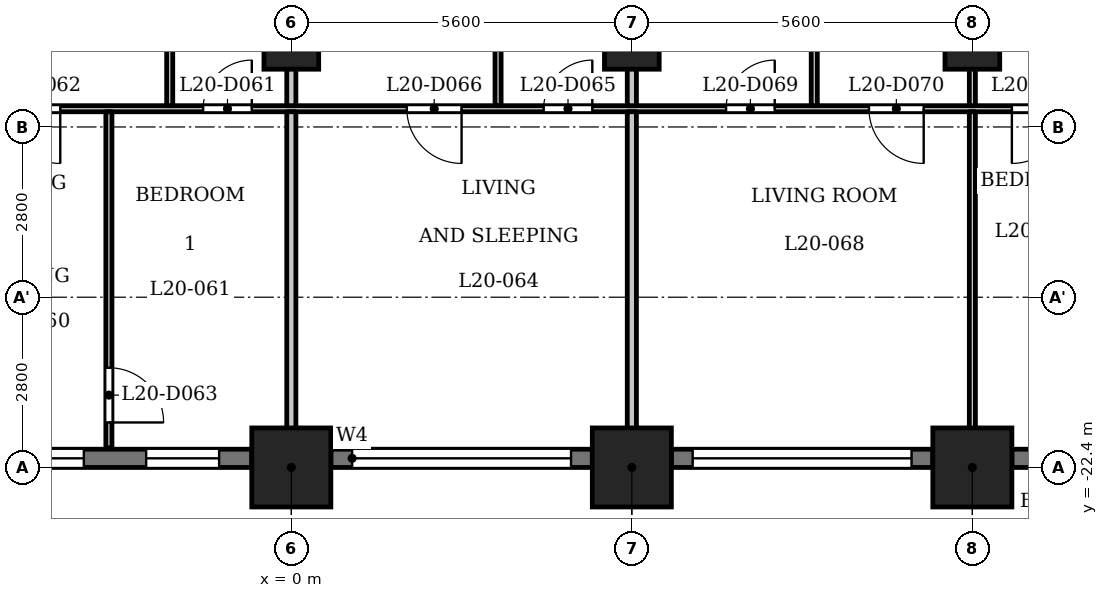
"""IFC4 building model, lengths in metres.
Left out: names, types, materials, properties, quantities, classifications, styles, units other than length and angle.
Written with IfcOpenShell. Run it as: python <this file> out.ifc"""

import sys

from ifc_helpers import new_model, si_unit, direction, frame, frame_2d, origin, origin_2d, place, context, subcontext, project, spatial, rectangle, extrude, element, fill, save


model = new_model("IFC4")
c1 = context("Model", 3, precision=1e-05, world=origin(), true_north=direction((0.0, 1.0)))
c2 = subcontext(c1, "Body", "Model", "MODEL_VIEW")
j1 = project(units=[si_unit("LENGTHUNIT", "METRE"), si_unit("PLANEANGLEUNIT", "RADIAN")], contexts=[c1])
p1 = place(None, origin())
s1 = spatial("IfcSite", under=j1, at=p1, CompositionType="ELEMENT")
p2 = place(p1, origin())
s2 = spatial("IfcBuilding", under=s1, at=p2, CompositionType="ELEMENT")
p3 = place(p2, frame((0.0, 0.0, 83.3)))
s3 = spatial("IfcBuildingStorey", under=s2, at=p3, CompositionType="ELEMENT", Elevation=83.3)
for number, where, z_axis, x_axis in (
    (1, (0.0, -22.4, 0.0), (0.0, 0.0, 1.0), (1.0, 0.0, 0.0)),
    (2, (5.6, -22.4, 0.0), (0.0, 0.0, 1.0), (1.0, 0.0, 0.0)),
    (3, (11.2, -22.4, 0.0), (0.0, 0.0, 1.0), (1.0, 0.0, 0.0)),
):
    element("IfcColumn", number, at=place(p3, frame(where, z_axis=z_axis, x_axis=x_axis)), inside=s3, PredefinedType="COLUMN", context=c2, shape_type="SweptSolid", body=[
        extrude(rectangle(XDim=1.3, YDim=1.3, at=origin_2d()), origin(), (0.0, 0.0, 1.0), 3.5),
    ])
for number, where, z_axis, x_axis in (
    (4, (0.0, -15.4, 0.0), (0.0, 0.0, 1.0), (1.0, 0.0, 0.0)),
    (5, (5.6, -15.4, 0.0), (0.0, 0.0, 1.0), (1.0, 0.0, 0.0)),
    (6, (11.2, -15.4, 0.0), (0.0, 0.0, 1.0), (1.0, 0.0, 0.0)),
):
    element("IfcColumn", number, at=place(p3, frame(where, z_axis=z_axis, x_axis=x_axis)), inside=s3, PredefinedType="COLUMN", context=c2, shape_type="SweptSolid", body=[
        extrude(rectangle(XDim=0.9, YDim=0.9, at=origin_2d()), origin(), (0.0, 0.0, 1.0), 3.5),
    ])
p4 = place(p3, frame((-4.95, -22.25, 0.0), z_axis=(0.0, 0.0, 1.0), x_axis=(1.0, 0.0, 0.0)))
e7 = element("IfcWall", 7, at=p4, inside=s3, PredefinedType="SOLIDWALL", context=c2, shape_type="SweptSolid", body=[
    extrude(rectangle(XDim=4.3, YDim=0.3, at=frame_2d((2.15, 0.0))), origin(), (0.0, 0.0, 1.0), 2.4),
])
p5 = place(p4, frame((0.337, 0.0, 0.6)))
e8 = element("IfcOpeningElement", 8, at=p5, cuts=e7, PredefinedType="OPENING", context=c2, shape_type="SweptSolid", body=[
    extrude(rectangle(XDim=1.2, YDim=1.55, at=frame_2d((0.6, 0.775))), frame((0.0, 0.16, 0.0), z_axis=(0.0, -1.0, 0.0), x_axis=(1.0, 0.0, 0.0)), (0.0, 0.0, 1.0), 0.32),
])
p6 = place(p4, frame((2.562, 0.0, 0.6)))
e9 = element("IfcOpeningElement", 9, at=p6, cuts=e7, PredefinedType="OPENING", context=c2, shape_type="SweptSolid", body=[
    extrude(rectangle(XDim=1.2, YDim=1.55, at=frame_2d((0.6, 0.775))), frame((0.0, 0.16, 0.0), z_axis=(0.0, -1.0, 0.0), x_axis=(1.0, 0.0, 0.0)), (0.0, 0.0, 1.0), 0.32),
])
p7 = place(p3, frame((0.65, -22.25, 0.0), z_axis=(0.0, 0.0, 1.0), x_axis=(1.0, 0.0, 0.0)))
e10 = element("IfcWall", 10, at=p7, inside=s3, PredefinedType="SOLIDWALL", context=c2, shape_type="SweptSolid", body=[
    extrude(rectangle(XDim=4.3, YDim=0.3, at=frame_2d((2.15, 0.0))), origin(), (0.0, 0.0, 1.0), 2.4),
])
p8 = place(p7, frame((0.35, 0.0, 1.2)))
e11 = element("IfcOpeningElement", 11, at=p8, cuts=e10, PredefinedType="OPENING", context=c2, shape_type="SweptSolid", body=[
    extrude(rectangle(XDim=3.6, YDim=0.95, at=frame_2d((1.8, 0.475))), frame((0.0, 0.16, 0.0), z_axis=(0.0, -1.0, 0.0), x_axis=(1.0, 0.0, 0.0)), (0.0, 0.0, 1.0), 0.32),
])
p9 = place(p3, frame((6.25, -22.25, 0.0), z_axis=(0.0, 0.0, 1.0), x_axis=(1.0, 0.0, 0.0)))
e12 = element("IfcWall", 12, at=p9, inside=s3, PredefinedType="SOLIDWALL", context=c2, shape_type="SweptSolid", body=[
    extrude(rectangle(XDim=4.3, YDim=0.3, at=frame_2d((2.15, 0.0))), origin(), (0.0, 0.0, 1.0), 2.4),
])
p10 = place(p9, frame((0.35, 0.0, 1.2)))
e13 = element("IfcOpeningElement", 13, at=p10, cuts=e12, PredefinedType="OPENING", context=c2, shape_type="SweptSolid", body=[
    extrude(rectangle(XDim=3.6, YDim=0.95, at=frame_2d((1.8, 0.475))), frame((0.0, 0.16, 0.0), z_axis=(0.0, -1.0, 0.0), x_axis=(1.0, 0.0, 0.0)), (0.0, 0.0, 1.0), 0.32),
])
p11 = place(p3, frame((11.85, -22.25, 0.0), z_axis=(0.0, 0.0, 1.0), x_axis=(1.0, 0.0, 0.0)))
e14 = element("IfcWall", 14, at=p11, inside=s3, PredefinedType="SOLIDWALL", context=c2, shape_type="SweptSolid", body=[
    extrude(rectangle(XDim=4.3, YDim=0.3, at=frame_2d((2.15, 0.0))), origin(), (0.0, 0.0, 1.0), 2.4),
])
p12 = place(p11, frame((0.337, 0.0, 0.6)))
e15 = element("IfcOpeningElement", 15, at=p12, cuts=e14, PredefinedType="OPENING", context=c2, shape_type="SweptSolid", body=[
    extrude(rectangle(XDim=1.2, YDim=1.55, at=frame_2d((0.6, 0.775))), frame((0.0, 0.16, 0.0), z_axis=(0.0, -1.0, 0.0), x_axis=(1.0, 0.0, 0.0)), (0.0, 0.0, 1.0), 0.32),
])
p13 = place(p11, frame((2.562, 0.0, 0.6)))
e16 = element("IfcOpeningElement", 16, at=p13, cuts=e14, PredefinedType="OPENING", context=c2, shape_type="SweptSolid", body=[
    extrude(rectangle(XDim=1.2, YDim=1.55, at=frame_2d((0.6, 0.775))), frame((0.0, 0.16, 0.0), z_axis=(0.0, -1.0, 0.0), x_axis=(1.0, 0.0, 0.0)), (0.0, 0.0, 1.0), 0.32),
])
p14 = place(p3, frame((-16.725, -16.5, 0.0), z_axis=(0.0, 0.0, 1.0), x_axis=(1.0, 0.0, 0.0)))
e17 = element("IfcWall", 17, at=p14, inside=s3, PredefinedType="PARTITIONING", context=c2, shape_type="SweptSolid", body=[
    extrude(rectangle(XDim=33.45, YDim=0.1, at=frame_2d((16.725, 0.0))), origin(), (0.0, 0.0, 1.0), 3.2),
])
p15 = place(p14, frame((3.825, 0.0, 0.0)))
e18 = element("IfcOpeningElement", 18, at=p15, cuts=e17, PredefinedType="OPENING", context=c2, shape_type="SweptSolid", body=[
    extrude(rectangle(XDim=0.8, YDim=2.1, at=frame_2d((0.4, 1.05))), frame((0.0, 0.06, 0.0), z_axis=(0.0, -1.0, 0.0), x_axis=(1.0, 0.0, 0.0)), (0.0, 0.0, 1.0), 0.12),
])
p16 = place(p14, frame((1.825, 0.0, 0.0)))
e19 = element("IfcOpeningElement", 19, at=p16, cuts=e17, PredefinedType="OPENING", context=c2, shape_type="SweptSolid", body=[
    extrude(rectangle(XDim=0.9, YDim=2.1, at=frame_2d((0.45, 1.05))), frame((0.0, 0.06, 0.0), z_axis=(0.0, -1.0, 0.0), x_axis=(1.0, 0.0, 0.0)), (0.0, 0.0, 1.0), 0.12),
])
p17 = place(p14, frame((9.675, 0.0, 0.0)))
e20 = element("IfcOpeningElement", 20, at=p17, cuts=e17, PredefinedType="OPENING", context=c2, shape_type="SweptSolid", body=[
    extrude(rectangle(XDim=0.8, YDim=2.1, at=frame_2d((0.4, 1.05))), frame((0.0, 0.06, 0.0), z_axis=(0.0, -1.0, 0.0), x_axis=(1.0, 0.0, 0.0)), (0.0, 0.0, 1.0), 0.12),
])
p18 = place(p14, frame((6.425, 0.0, 0.0)))
e21 = element("IfcOpeningElement", 21, at=p18, cuts=e17, PredefinedType="OPENING", context=c2, shape_type="SweptSolid", body=[
    extrude(rectangle(XDim=0.9, YDim=2.1, at=frame_2d((0.45, 1.05))), frame((0.0, 0.06, 0.0), z_axis=(0.0, -1.0, 0.0), x_axis=(1.0, 0.0, 0.0)), (0.0, 0.0, 1.0), 0.12),
])
p19 = place(p14, frame((15.275, 0.0, 0.0)))
e22 = element("IfcOpeningElement", 22, at=p19, cuts=e17, PredefinedType="OPENING", context=c2, shape_type="SweptSolid", body=[
    extrude(rectangle(XDim=0.8, YDim=2.1, at=frame_2d((0.4, 1.05))), frame((0.0, 0.06, 0.0), z_axis=(0.0, -1.0, 0.0), x_axis=(1.0, 0.0, 0.0)), (0.0, 0.0, 1.0), 0.12),
])
p20 = place(p14, frame((12.025, 0.0, 0.0)))
e23 = element("IfcOpeningElement", 23, at=p20, cuts=e17, PredefinedType="OPENING", context=c2, shape_type="SweptSolid", body=[
    extrude(rectangle(XDim=0.9, YDim=2.1, at=frame_2d((0.45, 1.05))), frame((0.0, 0.06, 0.0), z_axis=(0.0, -1.0, 0.0), x_axis=(1.0, 0.0, 0.0)), (0.0, 0.0, 1.0), 0.12),
])
p21 = place(p14, frame((20.875, 0.0, 0.0)))
e24 = element("IfcOpeningElement", 24, at=p21, cuts=e17, PredefinedType="OPENING", context=c2, shape_type="SweptSolid", body=[
    extrude(rectangle(XDim=0.8, YDim=2.1, at=frame_2d((0.4, 1.05))), frame((0.0, 0.06, 0.0), z_axis=(0.0, -1.0, 0.0), x_axis=(1.0, 0.0, 0.0)), (0.0, 0.0, 1.0), 0.12),
])
p22 = place(p14, frame((18.625, 0.0, 0.0)))
e25 = element("IfcOpeningElement", 25, at=p22, cuts=e17, PredefinedType="OPENING", context=c2, shape_type="SweptSolid", body=[
    extrude(rectangle(XDim=0.9, YDim=2.1, at=frame_2d((0.45, 1.05))), frame((0.0, 0.06, 0.0), z_axis=(0.0, -1.0, 0.0), x_axis=(1.0, 0.0, 0.0)), (0.0, 0.0, 1.0), 0.12),
])
p23 = place(p14, frame((23.875, 0.0, 0.0)))
e26 = element("IfcOpeningElement", 26, at=p23, cuts=e17, PredefinedType="OPENING", context=c2, shape_type="SweptSolid", body=[
    extrude(rectangle(XDim=0.8, YDim=2.1, at=frame_2d((0.4, 1.05))), frame((0.0, 0.06, 0.0), z_axis=(0.0, -1.0, 0.0), x_axis=(1.0, 0.0, 0.0)), (0.0, 0.0, 1.0), 0.12),
])
p24 = place(p14, frame((26.225, 0.0, 0.0)))
e27 = element("IfcOpeningElement", 27, at=p24, cuts=e17, PredefinedType="OPENING", context=c2, shape_type="SweptSolid", body=[
    extrude(rectangle(XDim=0.9, YDim=2.1, at=frame_2d((0.45, 1.05))), frame((0.0, 0.06, 0.0), z_axis=(0.0, -1.0, 0.0), x_axis=(1.0, 0.0, 0.0)), (0.0, 0.0, 1.0), 0.12),
])
p25 = place(p14, frame((28.575, 0.0, 0.0)))
e28 = element("IfcOpeningElement", 28, at=p25, cuts=e17, PredefinedType="OPENING", context=c2, shape_type="SweptSolid", body=[
    extrude(rectangle(XDim=0.9, YDim=2.1, at=frame_2d((0.45, 1.05))), frame((0.0, 0.06, 0.0), z_axis=(0.0, -1.0, 0.0), x_axis=(1.0, 0.0, 0.0)), (0.0, 0.0, 1.0), 0.12),
])
p26 = place(p14, frame((30.675, 0.0, 0.0)))
e29 = element("IfcOpeningElement", 29, at=p26, cuts=e17, PredefinedType="OPENING", context=c2, shape_type="SweptSolid", body=[
    extrude(rectangle(XDim=0.9, YDim=2.1, at=frame_2d((0.45, 1.05))), frame((0.0, 0.06, 0.0), z_axis=(0.0, -1.0, 0.0), x_axis=(1.0, 0.0, 0.0)), (0.0, 0.0, 1.0), 0.12),
])
p27 = place(p3, frame((-3.0, -22.08, 0.0), z_axis=(0.0, 0.0, 1.0), x_axis=(0.0, 1.0, 0.0)))
e30 = element("IfcWall", 30, at=p27, inside=s3, PredefinedType="PARTITIONING", context=c2, shape_type="SweptSolid", body=[
    extrude(rectangle(XDim=5.53, YDim=0.1, at=frame_2d((2.765, 0.0))), origin(), (0.0, 0.0, 1.0), 3.2),
])
p28 = place(p27, frame((0.42, 0.0, 0.0)))
e31 = element("IfcOpeningElement", 31, at=p28, cuts=e30, PredefinedType="OPENING", context=c2, shape_type="SweptSolid", body=[
    extrude(rectangle(XDim=0.9, YDim=2.1, at=frame_2d((0.45, 1.05))), frame((0.0, 0.06, 0.0), z_axis=(0.0, -1.0, 0.0), x_axis=(1.0, 0.0, 0.0)), (0.0, 0.0, 1.0), 0.12),
])
p29 = place(p3, frame((-2.0, -16.45, 0.0), z_axis=(0.0, 0.0, 1.0), x_axis=(0.0, 1.0, 0.0)))
e32 = element("IfcWall", 32, at=p29, inside=s3, PredefinedType="PARTITIONING", context=c2, shape_type="SweptSolid", body=[
    extrude(rectangle(XDim=3.175, YDim=0.1, at=frame_2d((1.587, 0.0))), origin(), (0.0, 0.0, 1.0), 3.2),
])
p30 = place(p3, frame((0.0, -23.03, 0.0), z_axis=(0.0, 0.0, 1.0), x_axis=(0.0, 1.0, 0.0)))
e33 = element("IfcWall", 33, at=p30, inside=s3, PredefinedType="PARTITIONING", context=c2, shape_type="SweptSolid", body=[
    extrude(rectangle(XDim=6.48, YDim=0.15, at=frame_2d((3.24, 0.0))), origin(), (0.0, 0.0, 1.0), 3.2),
])
p31 = place(p3, frame((0.0, -16.45, 0.0), z_axis=(0.0, 0.0, 1.0), x_axis=(0.0, 1.0, 0.0)))
e34 = element("IfcWall", 34, at=p31, inside=s3, PredefinedType="PARTITIONING", context=c2, shape_type="SweptSolid", body=[
    extrude(rectangle(XDim=3.175, YDim=0.15, at=frame_2d((1.587, 0.0))), origin(), (0.0, 0.0, 1.0), 3.2),
])
p32 = place(p3, frame((3.4, -16.45, 0.0), z_axis=(0.0, 0.0, 1.0), x_axis=(0.0, 1.0, 0.0)))
e35 = element("IfcWall", 35, at=p32, inside=s3, PredefinedType="PARTITIONING", context=c2, shape_type="SweptSolid", body=[
    extrude(rectangle(XDim=3.175, YDim=0.1, at=frame_2d((1.587, 0.0))), origin(), (0.0, 0.0, 1.0), 3.2),
])
p33 = place(p3, frame((5.6, -23.03, 0.0), z_axis=(0.0, 0.0, 1.0), x_axis=(0.0, 1.0, 0.0)))
e36 = element("IfcWall", 36, at=p33, inside=s3, PredefinedType="PARTITIONING", context=c2, shape_type="SweptSolid", body=[
    extrude(rectangle(XDim=6.48, YDim=0.15, at=frame_2d((3.24, 0.0))), origin(), (0.0, 0.0, 1.0), 3.2),
])
p34 = place(p3, frame((5.6, -16.45, 0.0), z_axis=(0.0, 0.0, 1.0), x_axis=(0.0, 1.0, 0.0)))
e37 = element("IfcWall", 37, at=p34, inside=s3, PredefinedType="PARTITIONING", context=c2, shape_type="SweptSolid", body=[
    extrude(rectangle(XDim=3.175, YDim=0.15, at=frame_2d((1.587, 0.0))), origin(), (0.0, 0.0, 1.0), 3.2),
])
p35 = place(p3, frame((8.6, -16.45, 0.0), z_axis=(0.0, 0.0, 1.0), x_axis=(0.0, 1.0, 0.0)))
e38 = element("IfcWall", 38, at=p35, inside=s3, PredefinedType="PARTITIONING", context=c2, shape_type="SweptSolid", body=[
    extrude(rectangle(XDim=3.175, YDim=0.1, at=frame_2d((1.587, 0.0))), origin(), (0.0, 0.0, 1.0), 3.2),
])
p36 = place(p3, frame((11.2, -23.03, 0.0), z_axis=(0.0, 0.0, 1.0), x_axis=(0.0, 1.0, 0.0)))
e39 = element("IfcWall", 39, at=p36, inside=s3, PredefinedType="PARTITIONING", context=c2, shape_type="SweptSolid", body=[
    extrude(rectangle(XDim=6.48, YDim=0.1, at=frame_2d((3.24, 0.0))), origin(), (0.0, 0.0, 1.0), 3.2),
])
p37 = place(p3, frame((11.2, -16.45, 0.0), z_axis=(0.0, 0.0, 1.0), x_axis=(0.0, 1.0, 0.0)))
e40 = element("IfcWall", 40, at=p37, inside=s3, PredefinedType="PARTITIONING", context=c2, shape_type="SweptSolid", body=[
    extrude(rectangle(XDim=3.175, YDim=0.1, at=frame_2d((1.587, 0.0))), origin(), (0.0, 0.0, 1.0), 3.2),
])
p38 = place(p37, frame((1.699, 0.0, 0.0)))
e41 = element("IfcOpeningElement", 41, at=p38, cuts=e40, PredefinedType="OPENING", context=c2, shape_type="SweptSolid", body=[
    extrude(rectangle(XDim=0.9, YDim=2.1, at=frame_2d((0.45, 1.05))), frame((0.0, 0.06, 0.0), z_axis=(0.0, -1.0, 0.0), x_axis=(1.0, 0.0, 0.0)), (0.0, 0.0, 1.0), 0.12),
])
p39 = place(p19, origin())
e42 = element("IfcDoor", 42, at=p39, inside=s3, OperationType="SINGLE_SWING_LEFT", PredefinedType="DOOR", context=c2, shape_type="SweptSolid", body=[
    extrude(rectangle(XDim=0.8, YDim=2.1, at=frame_2d((0.4, 1.05))), frame((0.0, 0.025, 0.0), z_axis=(0.0, -1.0, 0.0), x_axis=(1.0, 0.0, 0.0)), (0.0, 0.0, 1.0), 0.05),
])
fill(e22, e42)
p40 = place(p20, origin())
e43 = element("IfcDoor", 43, at=p40, inside=s3, OperationType="SINGLE_SWING_RIGHT", PredefinedType="DOOR", context=c2, shape_type="SweptSolid", body=[
    extrude(rectangle(XDim=0.9, YDim=2.1, at=frame_2d((0.45, 1.05))), frame((0.0, 0.025, 0.0), z_axis=(0.0, -1.0, 0.0), x_axis=(1.0, 0.0, 0.0)), (0.0, 0.0, 1.0), 0.05),
])
fill(e23, e43)
p41 = place(p28, origin())
e44 = element("IfcDoor", 44, at=p41, inside=s3, OperationType="SINGLE_SWING_LEFT", PredefinedType="DOOR", context=c2, shape_type="SweptSolid", body=[
    extrude(rectangle(XDim=0.9, YDim=2.1, at=frame_2d((0.45, 1.05))), frame((0.0, 0.025, 0.0), z_axis=(0.0, -1.0, 0.0), x_axis=(1.0, 0.0, 0.0)), (0.0, 0.0, 1.0), 0.05),
])
fill(e31, e44)
p42 = place(p21, origin())
e45 = element("IfcDoor", 45, at=p42, inside=s3, OperationType="SINGLE_SWING_LEFT", PredefinedType="DOOR", context=c2, shape_type="SweptSolid", body=[
    extrude(rectangle(XDim=0.8, YDim=2.1, at=frame_2d((0.4, 1.05))), frame((0.0, 0.025, 0.0), z_axis=(0.0, -1.0, 0.0), x_axis=(1.0, 0.0, 0.0)), (0.0, 0.0, 1.0), 0.05),
])
fill(e24, e45)
p43 = place(p22, origin())
e46 = element("IfcDoor", 46, at=p43, inside=s3, OperationType="SINGLE_SWING_RIGHT", PredefinedType="DOOR", context=c2, shape_type="SweptSolid", body=[
    extrude(rectangle(XDim=0.9, YDim=2.1, at=frame_2d((0.45, 1.05))), frame((0.0, 0.025, 0.0), z_axis=(0.0, -1.0, 0.0), x_axis=(1.0, 0.0, 0.0)), (0.0, 0.0, 1.0), 0.05),
])
fill(e25, e46)
p44 = place(p23, origin())
e47 = element("IfcDoor", 47, at=p44, inside=s3, OperationType="SINGLE_SWING_LEFT", PredefinedType="DOOR", context=c2, shape_type="SweptSolid", body=[
    extrude(rectangle(XDim=0.8, YDim=2.1, at=frame_2d((0.4, 1.05))), frame((0.0, 0.025, 0.0), z_axis=(0.0, -1.0, 0.0), x_axis=(1.0, 0.0, 0.0)), (0.0, 0.0, 1.0), 0.05),
])
fill(e26, e47)
p45 = place(p24, origin())
e48 = element("IfcDoor", 48, at=p45, inside=s3, OperationType="SINGLE_SWING_RIGHT", PredefinedType="DOOR", context=c2, shape_type="SweptSolid", body=[
    extrude(rectangle(XDim=0.9, YDim=2.1, at=frame_2d((0.45, 1.05))), frame((0.0, 0.025, 0.0), z_axis=(0.0, -1.0, 0.0), x_axis=(1.0, 0.0, 0.0)), (0.0, 0.0, 1.0), 0.05),
])
fill(e27, e48)
p46 = place(p25, origin())
e49 = element("IfcDoor", 49, at=p46, inside=s3, OperationType="SINGLE_SWING_LEFT", PredefinedType="DOOR", context=c2, shape_type="SweptSolid", body=[
    extrude(rectangle(XDim=0.9, YDim=2.1, at=frame_2d((0.45, 1.05))), frame((0.0, 0.025, 0.0), z_axis=(0.0, -1.0, 0.0), x_axis=(1.0, 0.0, 0.0)), (0.0, 0.0, 1.0), 0.05),
])
fill(e28, e49)
p47 = place(p5, origin())
e50 = element("IfcWindow", 50, at=p47, inside=s3, PartitioningType="SINGLE_PANEL", PredefinedType="WINDOW", context=c2, shape_type="SweptSolid", body=[
    extrude(rectangle(XDim=1.2, YDim=1.55, at=frame_2d((0.6, 0.775))), frame((0.0, 0.03, 0.0), z_axis=(0.0, -1.0, 0.0), x_axis=(1.0, 0.0, 0.0)), (0.0, 0.0, 1.0), 0.06),
])
fill(e8, e50)
p48 = place(p6, origin())
e51 = element("IfcWindow", 51, at=p48, inside=s3, PartitioningType="SINGLE_PANEL", PredefinedType="WINDOW", context=c2, shape_type="SweptSolid", body=[
    extrude(rectangle(XDim=1.2, YDim=1.55, at=frame_2d((0.6, 0.775))), frame((0.0, 0.03, 0.0), z_axis=(0.0, -1.0, 0.0), x_axis=(1.0, 0.0, 0.0)), (0.0, 0.0, 1.0), 0.06),
])
fill(e9, e51)
p49 = place(p8, origin())
e52 = element("IfcWindow", 52, at=p49, inside=s3, PartitioningType="SINGLE_PANEL", PredefinedType="WINDOW", context=c2, shape_type="SweptSolid", body=[
    extrude(rectangle(XDim=3.6, YDim=0.95, at=frame_2d((1.8, 0.475))), frame((0.0, 0.03, 0.0), z_axis=(0.0, -1.0, 0.0), x_axis=(1.0, 0.0, 0.0)), (0.0, 0.0, 1.0), 0.06),
])
fill(e11, e52)
p50 = place(p10, origin())
e53 = element("IfcWindow", 53, at=p50, inside=s3, PartitioningType="SINGLE_PANEL", PredefinedType="WINDOW", context=c2, shape_type="SweptSolid", body=[
    extrude(rectangle(XDim=3.6, YDim=0.95, at=frame_2d((1.8, 0.475))), frame((0.0, 0.03, 0.0), z_axis=(0.0, -1.0, 0.0), x_axis=(1.0, 0.0, 0.0)), (0.0, 0.0, 1.0), 0.06),
])
fill(e13, e53)
save(model, sys.argv[1])
